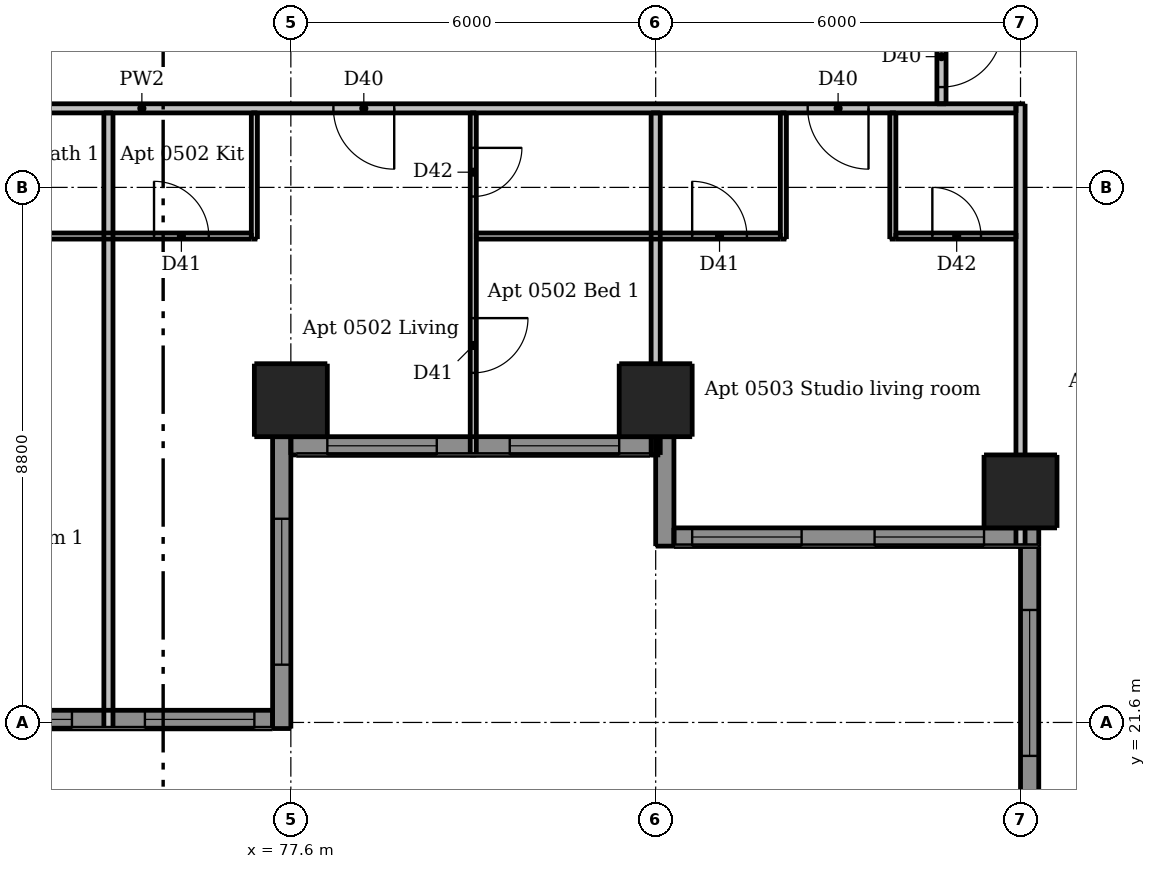
"""IFC4 building model, lengths in metres.
Left out: names, types, materials, properties, quantities, classifications, styles, units other than length and angle.
Written with IfcOpenShell. Run it as: python <this file> out.ifc"""

import sys

from ifc_helpers import new_model, si_unit, direction, frame, frame_2d, origin, origin_2d, place, context, subcontext, project, spatial, rectangle, extrude, element, fill, save


model = new_model("IFC4")
c1 = context("Model", 3, precision=1e-05, world=origin(), true_north=direction((0.0, 1.0)))
c2 = subcontext(c1, "Body", "Model", "MODEL_VIEW")
j1 = project(units=[si_unit("LENGTHUNIT", "METRE"), si_unit("PLANEANGLEUNIT", "RADIAN")], contexts=[c1])
p1 = place(None, origin())
s1 = spatial("IfcSite", under=j1, at=p1, CompositionType="ELEMENT")
p2 = place(p1, origin())
s2 = spatial("IfcBuilding", under=s1, at=p2, CompositionType="ELEMENT")
p3 = place(p2, frame((0.0, 0.0, 23.5)))
s3 = spatial("IfcBuildingStorey", under=s2, at=p3, CompositionType="ELEMENT", Elevation=23.5)
for number, where, z_axis, x_axis in (
    (1, (77.6, 26.9, 0.0), (0.0, 0.0, 1.0), (1.0, 0.0, 0.0)),
    (2, (83.6, 26.9, 0.0), (0.0, 0.0, 1.0), (1.0, 0.0, 0.0)),
    (3, (89.6, 25.4, 0.0), (0.0, 0.0, 1.0), (1.0, 0.0, 0.0)),
):
    element("IfcColumn", number, at=place(p3, frame(where, z_axis=z_axis, x_axis=x_axis)), inside=s3, PredefinedType="COLUMN", context=c2, shape_type="SweptSolid", body=[
        extrude(rectangle(XDim=1.2, YDim=1.2, at=origin_2d()), origin(), (0.0, 0.0, 1.0), 3.05),
    ])
p4 = place(p3, frame((77.45, 21.5, 0.0), z_axis=(0.0, 0.0, 1.0), x_axis=(0.0, 1.0, 0.0)))
e4 = element("IfcWall", 4, at=p4, inside=s3, PredefinedType="SOLIDWALL", context=c2, shape_type="SweptSolid", body=[
    extrude(rectangle(XDim=4.8, YDim=0.3, at=frame_2d((2.4, 0.0))), origin(), (0.0, 0.0, 1.0), 3.05),
])
p5 = place(p4, frame((1.05, 0.0, 0.15)))
e5 = element("IfcOpeningElement", 5, at=p5, cuts=e4, PredefinedType="OPENING", context=c2, shape_type="SweptSolid", body=[
    extrude(rectangle(XDim=2.4, YDim=2.1, at=frame_2d((1.2, 1.05))), frame((0.0, 0.16, 0.0), z_axis=(0.0, -1.0, 0.0), x_axis=(1.0, 0.0, 0.0)), (0.0, 0.0, 1.0), 0.32),
])
p6 = place(p3, frame((83.75, 26.3, 0.0), z_axis=(0.0, 0.0, 1.0), x_axis=(0.0, -1.0, 0.0)))
e6 = element("IfcWall", 6, at=p6, inside=s3, PredefinedType="SOLIDWALL", context=c2, shape_type="SweptSolid", body=[
    extrude(rectangle(XDim=1.8, YDim=0.3, at=frame_2d((0.9, 0.0))), origin(), (0.0, 0.0, 1.0), 3.05),
])
p7 = place(p3, frame((89.75, 24.5, 0.0), z_axis=(0.0, 0.0, 1.0), x_axis=(0.0, -1.0, 0.0)))
e7 = element("IfcWall", 7, at=p7, inside=s3, PredefinedType="SOLIDWALL", context=c2, shape_type="SweptSolid", body=[
    extrude(rectangle(XDim=4.5, YDim=0.3, at=frame_2d((2.25, 0.0))), origin(), (0.0, 0.0, 1.0), 3.05),
])
p8 = place(p7, frame((1.05, 0.0, 0.15)))
e8 = element("IfcOpeningElement", 8, at=p8, cuts=e7, PredefinedType="OPENING", context=c2, shape_type="SweptSolid", body=[
    extrude(rectangle(XDim=2.4, YDim=2.1, at=frame_2d((1.2, 1.05))), frame((0.0, 0.16, 0.0), z_axis=(0.0, -1.0, 0.0), x_axis=(1.0, 0.0, 0.0)), (0.0, 0.0, 1.0), 0.32),
])
p9 = place(p3, frame((71.6, 21.65, 0.0), z_axis=(0.0, 0.0, 1.0), x_axis=(1.0, 0.0, 0.0)))
e9 = element("IfcWall", 9, at=p9, inside=s3, PredefinedType="SOLIDWALL", context=c2, shape_type="SweptSolid", body=[
    extrude(rectangle(XDim=5.7, YDim=0.3, at=frame_2d((2.85, 0.0))), origin(), (0.0, 0.0, 1.0), 3.05),
])
p10 = place(p9, frame((0.6, 0.0, 0.15)))
e10 = element("IfcOpeningElement", 10, at=p10, cuts=e9, PredefinedType="OPENING", context=c2, shape_type="SweptSolid", body=[
    extrude(rectangle(XDim=1.8, YDim=2.1, at=frame_2d((0.9, 1.05))), frame((0.0, 0.16, 0.0), z_axis=(0.0, -1.0, 0.0), x_axis=(1.0, 0.0, 0.0)), (0.0, 0.0, 1.0), 0.32),
])
p11 = place(p9, frame((3.6, 0.0, 0.15)))
e11 = element("IfcOpeningElement", 11, at=p11, cuts=e9, PredefinedType="OPENING", context=c2, shape_type="SweptSolid", body=[
    extrude(rectangle(XDim=1.8, YDim=2.1, at=frame_2d((0.9, 1.05))), frame((0.0, 0.16, 0.0), z_axis=(0.0, -1.0, 0.0), x_axis=(1.0, 0.0, 0.0)), (0.0, 0.0, 1.0), 0.32),
])
p12 = place(p3, frame((77.6, 26.15, 0.0), z_axis=(0.0, 0.0, 1.0), x_axis=(1.0, 0.0, 0.0)))
e12 = element("IfcWall", 12, at=p12, inside=s3, PredefinedType="SOLIDWALL", context=c2, shape_type="SweptSolid", body=[
    extrude(rectangle(XDim=6.0, YDim=0.3, at=frame_2d((3.0, 0.0))), origin(), (0.0, 0.0, 1.0), 3.05),
])
p13 = place(p12, frame((0.6, 0.0, 0.15)))
e13 = element("IfcOpeningElement", 13, at=p13, cuts=e12, PredefinedType="OPENING", context=c2, shape_type="SweptSolid", body=[
    extrude(rectangle(XDim=1.8, YDim=2.1, at=frame_2d((0.9, 1.05))), frame((0.0, 0.16, 0.0), z_axis=(0.0, -1.0, 0.0), x_axis=(1.0, 0.0, 0.0)), (0.0, 0.0, 1.0), 0.32),
])
p14 = place(p12, frame((3.6, 0.0, 0.15)))
e14 = element("IfcOpeningElement", 14, at=p14, cuts=e12, PredefinedType="OPENING", context=c2, shape_type="SweptSolid", body=[
    extrude(rectangle(XDim=1.8, YDim=2.1, at=frame_2d((0.9, 1.05))), frame((0.0, 0.16, 0.0), z_axis=(0.0, -1.0, 0.0), x_axis=(1.0, 0.0, 0.0)), (0.0, 0.0, 1.0), 0.32),
])
p15 = place(p3, frame((83.9, 24.65, 0.0), z_axis=(0.0, 0.0, 1.0), x_axis=(1.0, 0.0, 0.0)))
e15 = element("IfcWall", 15, at=p15, inside=s3, PredefinedType="SOLIDWALL", context=c2, shape_type="SweptSolid", body=[
    extrude(rectangle(XDim=6.0, YDim=0.3, at=frame_2d((3.0, 0.0))), origin(), (0.0, 0.0, 1.0), 3.05),
])
p16 = place(p15, frame((0.3, 0.0, 0.15)))
e16 = element("IfcOpeningElement", 16, at=p16, cuts=e15, PredefinedType="OPENING", context=c2, shape_type="SweptSolid", body=[
    extrude(rectangle(XDim=1.8, YDim=2.1, at=frame_2d((0.9, 1.05))), frame((0.0, 0.16, 0.0), z_axis=(0.0, -1.0, 0.0), x_axis=(1.0, 0.0, 0.0)), (0.0, 0.0, 1.0), 0.32),
])
p17 = place(p15, frame((3.3, 0.0, 0.15)))
e17 = element("IfcOpeningElement", 17, at=p17, cuts=e15, PredefinedType="OPENING", context=c2, shape_type="SweptSolid", body=[
    extrude(rectangle(XDim=1.8, YDim=2.1, at=frame_2d((0.9, 1.05))), frame((0.0, 0.16, 0.0), z_axis=(0.0, -1.0, 0.0), x_axis=(1.0, 0.0, 0.0)), (0.0, 0.0, 1.0), 0.32),
])
p18 = place(p3, frame((77.0, 29.55, 0.0), z_axis=(0.0, 0.0, 1.0), x_axis=(0.0, 1.0, 0.0)))
e18 = element("IfcWall", 18, at=p18, inside=s3, PredefinedType="PARTITIONING", context=c2, shape_type="SweptSolid", body=[
    extrude(rectangle(XDim=2.075, YDim=0.1, at=frame_2d((1.038, 0.0))), origin(), (0.0, 0.0, 1.0), 3.05),
])
p19 = place(p3, frame((80.6, 31.625, 0.0), z_axis=(0.0, 0.0, 1.0), x_axis=(0.0, -1.0, 0.0)))
e19 = element("IfcWall", 19, at=p19, inside=s3, PredefinedType="PARTITIONING", context=c2, shape_type="SweptSolid", body=[
    extrude(rectangle(XDim=5.625, YDim=0.1, at=frame_2d((2.812, 0.0))), origin(), (0.0, 0.0, 1.0), 3.05),
])
p20 = place(p19, frame((3.375, 0.0, 0.0)))
e20 = element("IfcOpeningElement", 20, at=p20, cuts=e19, PredefinedType="OPENING", context=c2, shape_type="SweptSolid", body=[
    extrude(rectangle(XDim=0.9, YDim=2.1, at=frame_2d((0.45, 1.05))), frame((0.0, 0.06, 0.0), z_axis=(0.0, -1.0, 0.0), x_axis=(1.0, 0.0, 0.0)), (0.0, 0.0, 1.0), 0.12),
])
p21 = place(p19, frame((0.575, 0.0, 0.0)))
e21 = element("IfcOpeningElement", 21, at=p21, cuts=e19, PredefinedType="OPENING", context=c2, shape_type="SweptSolid", body=[
    extrude(rectangle(XDim=0.8, YDim=2.1, at=frame_2d((0.4, 1.05))), frame((0.0, 0.06, 0.0), z_axis=(0.0, -1.0, 0.0), x_axis=(1.0, 0.0, 0.0)), (0.0, 0.0, 1.0), 0.12),
])
for number, where, z_axis, x_axis in (
    (22, (85.7, 29.55, 0.0), (0.0, 0.0, 1.0), (0.0, 1.0, 0.0)),
    (23, (87.5, 29.55, 0.0), (0.0, 0.0, 1.0), (0.0, 1.0, 0.0)),
):
    element("IfcWall", number, at=place(p3, frame(where, z_axis=z_axis, x_axis=x_axis)), inside=s3, PredefinedType="PARTITIONING", context=c2, shape_type="SweptSolid", body=[
        extrude(rectangle(XDim=2.075, YDim=0.1, at=frame_2d((1.038, 0.0))), origin(), (0.0, 0.0, 1.0), 3.05),
    ])
p22 = place(p3, frame((68.15, 29.6, 0.0), z_axis=(0.0, 0.0, 1.0), x_axis=(1.0, 0.0, 0.0)))
e24 = element("IfcWall", 24, at=p22, inside=s3, PredefinedType="PARTITIONING", context=c2, shape_type="SweptSolid", body=[
    extrude(rectangle(XDim=8.8, YDim=0.1, at=frame_2d((4.4, 0.0))), origin(), (0.0, 0.0, 1.0), 3.05),
])
p23 = place(p22, frame((4.0, 0.0, 0.0)))
e25 = element("IfcOpeningElement", 25, at=p23, cuts=e24, PredefinedType="OPENING", context=c2, shape_type="SweptSolid", body=[
    extrude(rectangle(XDim=0.8, YDim=2.1, at=frame_2d((0.4, 1.05))), frame((0.0, 0.06, 0.0), z_axis=(0.0, -1.0, 0.0), x_axis=(1.0, 0.0, 0.0)), (0.0, 0.0, 1.0), 0.12),
])
p24 = place(p22, frame((7.2, 0.0, 0.0)))
e26 = element("IfcOpeningElement", 26, at=p24, cuts=e24, PredefinedType="OPENING", context=c2, shape_type="SweptSolid", body=[
    extrude(rectangle(XDim=0.9, YDim=2.1, at=frame_2d((0.45, 1.05))), frame((0.0, 0.06, 0.0), z_axis=(0.0, -1.0, 0.0), x_axis=(1.0, 0.0, 0.0)), (0.0, 0.0, 1.0), 0.12),
])
p25 = place(p3, frame((80.65, 29.6, 0.0), z_axis=(0.0, 0.0, 1.0), x_axis=(1.0, 0.0, 0.0)))
e27 = element("IfcWall", 27, at=p25, inside=s3, PredefinedType="PARTITIONING", context=c2, shape_type="SweptSolid", body=[
    extrude(rectangle(XDim=5.0, YDim=0.1, at=frame_2d((2.5, 0.0))), origin(), (0.0, 0.0, 1.0), 3.05),
])
p26 = place(p25, frame((3.55, 0.0, 0.0)))
e28 = element("IfcOpeningElement", 28, at=p26, cuts=e27, PredefinedType="OPENING", context=c2, shape_type="SweptSolid", body=[
    extrude(rectangle(XDim=0.9, YDim=2.1, at=frame_2d((0.45, 1.05))), frame((0.0, 0.06, 0.0), z_axis=(0.0, -1.0, 0.0), x_axis=(1.0, 0.0, 0.0)), (0.0, 0.0, 1.0), 0.12),
])
p27 = place(p3, frame((87.55, 29.6, 0.0), z_axis=(0.0, 0.0, 1.0), x_axis=(1.0, 0.0, 0.0)))
e29 = element("IfcWall", 29, at=p27, inside=s3, PredefinedType="PARTITIONING", context=c2, shape_type="SweptSolid", body=[
    extrude(rectangle(XDim=1.975, YDim=0.1, at=frame_2d((0.987, 0.0))), origin(), (0.0, 0.0, 1.0), 3.05),
])
p28 = place(p27, frame((0.6, 0.0, 0.0)))
e30 = element("IfcOpeningElement", 30, at=p28, cuts=e29, PredefinedType="OPENING", context=c2, shape_type="SweptSolid", body=[
    extrude(rectangle(XDim=0.8, YDim=2.1, at=frame_2d((0.4, 1.05))), frame((0.0, 0.06, 0.0), z_axis=(0.0, -1.0, 0.0), x_axis=(1.0, 0.0, 0.0)), (0.0, 0.0, 1.0), 0.12),
])
p29 = place(p3, frame((74.6, 21.5, 0.0), z_axis=(0.0, 0.0, 1.0), x_axis=(0.0, 1.0, 0.0)))
e31 = element("IfcWall", 31, at=p29, inside=s3, PredefinedType="PARTITIONING", context=c2, shape_type="SweptSolid", body=[
    extrude(rectangle(XDim=10.125, YDim=0.15, at=frame_2d((5.062, 0.0))), origin(), (0.0, 0.0, 1.0), 3.05),
])
p30 = place(p3, frame((83.6, 26.0, 0.0), z_axis=(0.0, 0.0, 1.0), x_axis=(0.0, 1.0, 0.0)))
e32 = element("IfcWall", 32, at=p30, inside=s3, PredefinedType="PARTITIONING", context=c2, shape_type="SweptSolid", body=[
    extrude(rectangle(XDim=5.625, YDim=0.15, at=frame_2d((2.812, 0.0))), origin(), (0.0, 0.0, 1.0), 2.647),
])
p31 = place(p3, frame((88.3, 60.475, 0.0), z_axis=(0.0, 0.0, 1.0), x_axis=(0.0, -1.0, 0.0)))
e33 = element("IfcWall", 33, at=p31, inside=s3, PredefinedType="PARTITIONING", context=c2, shape_type="SweptSolid", body=[
    extrude(rectangle(XDim=28.7, YDim=0.15, at=frame_2d((14.35, 0.0))), origin(), (0.0, 0.0, 1.0), 3.05),
])
p32 = place(p31, frame((27.425, 0.0, 0.0)))
e34 = element("IfcOpeningElement", 34, at=p32, cuts=e33, PredefinedType="OPENING", context=c2, shape_type="SweptSolid", body=[
    extrude(rectangle(XDim=1.0, YDim=2.1, at=frame_2d((0.5, 1.05))), frame((0.0, 0.085, 0.0), z_axis=(0.0, -1.0, 0.0), x_axis=(1.0, 0.0, 0.0)), (0.0, 0.0, 1.0), 0.17),
])
p33 = place(p31, frame((16.325, 0.0, 0.0)))
e35 = element("IfcOpeningElement", 35, at=p33, cuts=e33, PredefinedType="OPENING", context=c2, shape_type="SweptSolid", body=[
    extrude(rectangle(XDim=1.0, YDim=2.1, at=frame_2d((0.5, 1.05))), frame((0.0, 0.085, 0.0), z_axis=(0.0, -1.0, 0.0), x_axis=(1.0, 0.0, 0.0)), (0.0, 0.0, 1.0), 0.17),
])
p34 = place(p31, frame((5.525, 0.0, 0.0)))
e36 = element("IfcOpeningElement", 36, at=p34, cuts=e33, PredefinedType="OPENING", context=c2, shape_type="SweptSolid", body=[
    extrude(rectangle(XDim=1.0, YDim=2.1, at=frame_2d((0.5, 1.05))), frame((0.0, 0.085, 0.0), z_axis=(0.0, -1.0, 0.0), x_axis=(1.0, 0.0, 0.0)), (0.0, 0.0, 1.0), 0.17),
])
p35 = place(p3, frame((89.6, 24.5, 0.0), z_axis=(0.0, 0.0, 1.0), x_axis=(0.0, 1.0, 0.0)))
e37 = element("IfcWall", 37, at=p35, inside=s3, PredefinedType="PARTITIONING", context=c2, shape_type="SweptSolid", body=[
    extrude(rectangle(XDim=7.275, YDim=0.15, at=frame_2d((3.637, 0.0))), origin(), (0.0, 0.0, 1.0), 2.516),
])
p36 = place(p3, frame((89.525, 31.7, 0.0), z_axis=(0.0, 0.0, 1.0), x_axis=(-1.0, 0.0, 0.0)))
e38 = element("IfcWall", 38, at=p36, inside=s3, PredefinedType="PARTITIONING", context=c2, shape_type="SweptSolid", body=[
    extrude(rectangle(XDim=28.75, YDim=0.15, at=frame_2d((14.375, 0.0))), origin(), (0.0, 0.0, 1.0), 3.05),
])
p37 = place(p36, frame((24.625, 0.0, 0.0)))
e39 = element("IfcOpeningElement", 39, at=p37, cuts=e38, PredefinedType="OPENING", context=c2, shape_type="SweptSolid", body=[
    extrude(rectangle(XDim=1.0, YDim=2.1, at=frame_2d((0.5, 1.05))), frame((0.0, 0.085, 0.0), z_axis=(0.0, -1.0, 0.0), x_axis=(1.0, 0.0, 0.0)), (0.0, 0.0, 1.0), 0.17),
])
p38 = place(p36, frame((10.225, 0.0, 0.0)))
e40 = element("IfcOpeningElement", 40, at=p38, cuts=e38, PredefinedType="OPENING", context=c2, shape_type="SweptSolid", body=[
    extrude(rectangle(XDim=1.0, YDim=2.1, at=frame_2d((0.5, 1.05))), frame((0.0, 0.085, 0.0), z_axis=(0.0, -1.0, 0.0), x_axis=(1.0, 0.0, 0.0)), (0.0, 0.0, 1.0), 0.17),
])
p39 = place(p36, frame((2.425, 0.0, 0.0)))
e41 = element("IfcOpeningElement", 41, at=p39, cuts=e38, PredefinedType="OPENING", context=c2, shape_type="SweptSolid", body=[
    extrude(rectangle(XDim=1.0, YDim=2.1, at=frame_2d((0.5, 1.05))), frame((0.0, 0.085, 0.0), z_axis=(0.0, -1.0, 0.0), x_axis=(1.0, 0.0, 0.0)), (0.0, 0.0, 1.0), 0.17),
])
p40 = place(p5, origin())
e42 = element("IfcWindow", 42, at=p40, inside=s3, PartitioningType="DOUBLE_PANEL_VERTICAL", PredefinedType="WINDOW", context=c2, shape_type="SweptSolid", body=[
    extrude(rectangle(XDim=2.4, YDim=2.1, at=frame_2d((1.2, 1.05))), frame((0.0, 0.03, 0.0), z_axis=(0.0, -1.0, 0.0), x_axis=(1.0, 0.0, 0.0)), (0.0, 0.0, 1.0), 0.06),
])
fill(e5, e42)
p41 = place(p8, origin())
e43 = element("IfcWindow", 43, at=p41, inside=s3, PartitioningType="DOUBLE_PANEL_VERTICAL", PredefinedType="WINDOW", context=c2, shape_type="SweptSolid", body=[
    extrude(rectangle(XDim=2.4, YDim=2.1, at=frame_2d((1.2, 1.05))), frame((0.0, 0.03, 0.0), z_axis=(0.0, -1.0, 0.0), x_axis=(1.0, 0.0, 0.0)), (0.0, 0.0, 1.0), 0.06),
])
fill(e8, e43)
p42 = place(p10, origin())
e44 = element("IfcWindow", 44, at=p42, inside=s3, PartitioningType="DOUBLE_PANEL_VERTICAL", PredefinedType="WINDOW", context=c2, shape_type="SweptSolid", body=[
    extrude(rectangle(XDim=1.8, YDim=2.1, at=frame_2d((0.9, 1.05))), frame((0.0, 0.03, 0.0), z_axis=(0.0, -1.0, 0.0), x_axis=(1.0, 0.0, 0.0)), (0.0, 0.0, 1.0), 0.06),
])
fill(e10, e44)
p43 = place(p11, origin())
e45 = element("IfcWindow", 45, at=p43, inside=s3, PartitioningType="DOUBLE_PANEL_VERTICAL", PredefinedType="WINDOW", context=c2, shape_type="SweptSolid", body=[
    extrude(rectangle(XDim=1.8, YDim=2.1, at=frame_2d((0.9, 1.05))), frame((0.0, 0.03, 0.0), z_axis=(0.0, -1.0, 0.0), x_axis=(1.0, 0.0, 0.0)), (0.0, 0.0, 1.0), 0.06),
])
fill(e11, e45)
p44 = place(p13, origin())
e46 = element("IfcWindow", 46, at=p44, inside=s3, PartitioningType="DOUBLE_PANEL_VERTICAL", PredefinedType="WINDOW", context=c2, shape_type="SweptSolid", body=[
    extrude(rectangle(XDim=1.8, YDim=2.1, at=frame_2d((0.9, 1.05))), frame((0.0, 0.03, 0.0), z_axis=(0.0, -1.0, 0.0), x_axis=(1.0, 0.0, 0.0)), (0.0, 0.0, 1.0), 0.06),
])
fill(e13, e46)
p45 = place(p14, origin())
e47 = element("IfcWindow", 47, at=p45, inside=s3, PartitioningType="DOUBLE_PANEL_VERTICAL", PredefinedType="WINDOW", context=c2, shape_type="SweptSolid", body=[
    extrude(rectangle(XDim=1.8, YDim=2.1, at=frame_2d((0.9, 1.05))), frame((0.0, 0.03, 0.0), z_axis=(0.0, -1.0, 0.0), x_axis=(1.0, 0.0, 0.0)), (0.0, 0.0, 1.0), 0.06),
])
fill(e14, e47)
p46 = place(p16, origin())
e48 = element("IfcWindow", 48, at=p46, inside=s3, PartitioningType="DOUBLE_PANEL_VERTICAL", PredefinedType="WINDOW", context=c2, shape_type="SweptSolid", body=[
    extrude(rectangle(XDim=1.8, YDim=2.1, at=frame_2d((0.9, 1.05))), frame((0.0, 0.03, 0.0), z_axis=(0.0, -1.0, 0.0), x_axis=(1.0, 0.0, 0.0)), (0.0, 0.0, 1.0), 0.06),
])
fill(e16, e48)
p47 = place(p17, origin())
e49 = element("IfcWindow", 49, at=p47, inside=s3, PartitioningType="DOUBLE_PANEL_VERTICAL", PredefinedType="WINDOW", context=c2, shape_type="SweptSolid", body=[
    extrude(rectangle(XDim=1.8, YDim=2.1, at=frame_2d((0.9, 1.05))), frame((0.0, 0.03, 0.0), z_axis=(0.0, -1.0, 0.0), x_axis=(1.0, 0.0, 0.0)), (0.0, 0.0, 1.0), 0.06),
])
fill(e17, e49)
p48 = place(p38, origin())
e50 = element("IfcDoor", 50, at=p48, inside=s3, OperationType="SINGLE_SWING_LEFT", PredefinedType="DOOR", context=c2, shape_type="SweptSolid", body=[
    extrude(rectangle(XDim=1.0, YDim=2.1, at=frame_2d((0.5, 1.05))), frame((0.0, 0.025, 0.0), z_axis=(0.0, -1.0, 0.0), x_axis=(1.0, 0.0, 0.0)), (0.0, 0.0, 1.0), 0.05),
])
fill(e40, e50)
p49 = place(p24, origin())
e51 = element("IfcDoor", 51, at=p49, inside=s3, OperationType="SINGLE_SWING_LEFT", PredefinedType="DOOR", context=c2, shape_type="SweptSolid", body=[
    extrude(rectangle(XDim=0.9, YDim=2.1, at=frame_2d((0.45, 1.05))), frame((0.0, 0.025, 0.0), z_axis=(0.0, -1.0, 0.0), x_axis=(1.0, 0.0, 0.0)), (0.0, 0.0, 1.0), 0.05),
])
fill(e26, e51)
p50 = place(p20, origin())
e52 = element("IfcDoor", 52, at=p50, inside=s3, OperationType="SINGLE_SWING_LEFT", PredefinedType="DOOR", context=c2, shape_type="SweptSolid", body=[
    extrude(rectangle(XDim=0.9, YDim=2.1, at=frame_2d((0.45, 1.05))), frame((0.0, 0.025, 0.0), z_axis=(0.0, -1.0, 0.0), x_axis=(1.0, 0.0, 0.0)), (0.0, 0.0, 1.0), 0.05),
])
fill(e20, e52)
p51 = place(p21, origin())
e53 = element("IfcDoor", 53, at=p51, inside=s3, OperationType="SINGLE_SWING_LEFT", PredefinedType="DOOR", context=c2, shape_type="SweptSolid", body=[
    extrude(rectangle(XDim=0.8, YDim=2.1, at=frame_2d((0.4, 1.05))), frame((0.0, 0.025, 0.0), z_axis=(0.0, -1.0, 0.0), x_axis=(1.0, 0.0, 0.0)), (0.0, 0.0, 1.0), 0.05),
])
fill(e21, e53)
p52 = place(p39, origin())
e54 = element("IfcDoor", 54, at=p52, inside=s3, OperationType="SINGLE_SWING_LEFT", PredefinedType="DOOR", context=c2, shape_type="SweptSolid", body=[
    extrude(rectangle(XDim=1.0, YDim=2.1, at=frame_2d((0.5, 1.05))), frame((0.0, 0.025, 0.0), z_axis=(0.0, -1.0, 0.0), x_axis=(1.0, 0.0, 0.0)), (0.0, 0.0, 1.0), 0.05),
])
fill(e41, e54)
p53 = place(p26, origin())
e55 = element("IfcDoor", 55, at=p53, inside=s3, OperationType="SINGLE_SWING_LEFT", PredefinedType="DOOR", context=c2, shape_type="SweptSolid", body=[
    extrude(rectangle(XDim=0.9, YDim=2.1, at=frame_2d((0.45, 1.05))), frame((0.0, 0.025, 0.0), z_axis=(0.0, -1.0, 0.0), x_axis=(1.0, 0.0, 0.0)), (0.0, 0.0, 1.0), 0.05),
])
fill(e28, e55)
p54 = place(p28, origin())
e56 = element("IfcDoor", 56, at=p54, inside=s3, OperationType="SINGLE_SWING_LEFT", PredefinedType="DOOR", context=c2, shape_type="SweptSolid", body=[
    extrude(rectangle(XDim=0.8, YDim=2.1, at=frame_2d((0.4, 1.05))), frame((0.0, 0.025, 0.0), z_axis=(0.0, -1.0, 0.0), x_axis=(1.0, 0.0, 0.0)), (0.0, 0.0, 1.0), 0.05),
])
fill(e30, e56)
p55 = place(p32, origin())
e57 = element("IfcDoor", 57, at=p55, inside=s3, OperationType="SINGLE_SWING_LEFT", PredefinedType="DOOR", context=c2, shape_type="SweptSolid", body=[
    extrude(rectangle(XDim=1.0, YDim=2.1, at=frame_2d((0.5, 1.05))), frame((0.0, 0.025, 0.0), z_axis=(0.0, -1.0, 0.0), x_axis=(1.0, 0.0, 0.0)), (0.0, 0.0, 1.0), 0.05),
])
fill(e34, e57)
save(model, sys.argv[1])
